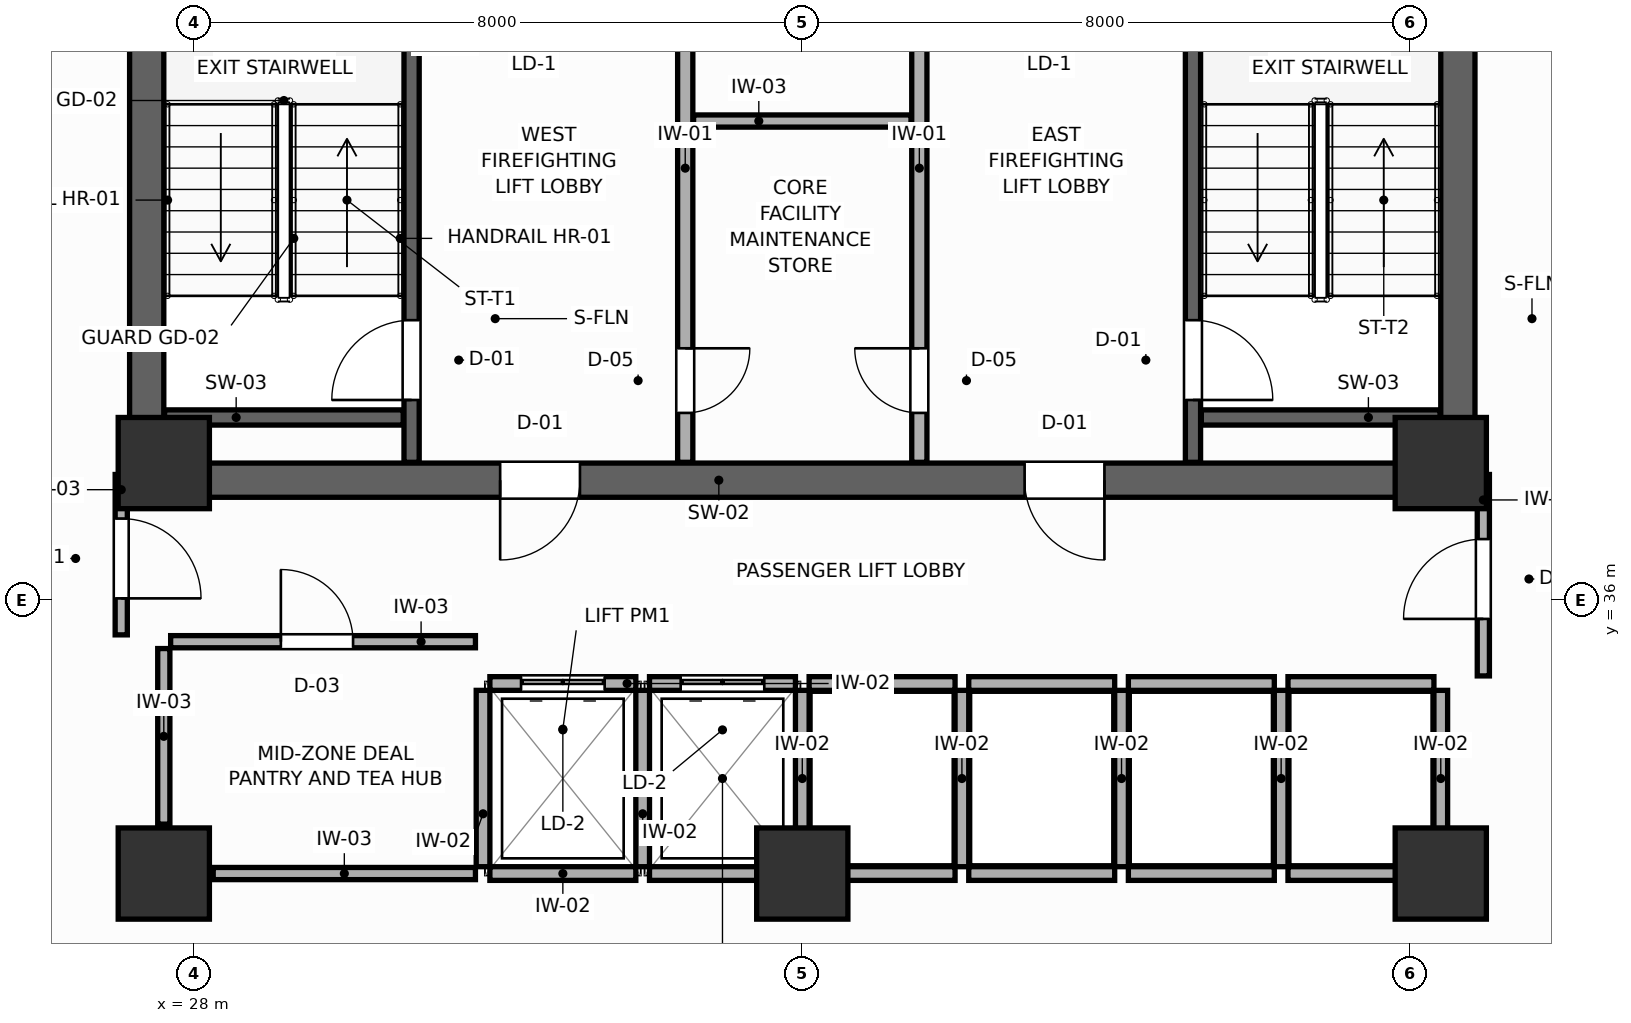
"""IFC4 building model, lengths in metres.
Left out: names, types, materials, properties, quantities, classifications, styles, units other than length and angle.
Written with IfcOpenShell. Run it as: python <this file> out.ifc"""

import sys

from ifc_helpers import new_model, si_unit, direction, frame, frame_2d, origin, origin_2d, place, context, subcontext, project, spatial, rectangle, extrude, source, transform, mapped, element, fill, save


model = new_model("IFC4")
c1 = context("Model", 3, precision=1e-05, world=origin(), true_north=direction((0.0, 1.0)))
c2 = subcontext(c1, "Body", "Model", "MODEL_VIEW")
j1 = project(units=[si_unit("LENGTHUNIT", "METRE"), si_unit("PLANEANGLEUNIT", "RADIAN")], contexts=[c1])
p1 = place(None, origin())
s1 = spatial("IfcSite", under=j1, at=p1, CompositionType="ELEMENT")
p2 = place(p1, origin())
s2 = spatial("IfcBuilding", under=s1, at=p2, CompositionType="ELEMENT")
p3 = place(p2, frame((0.0, 0.0, 157.8)))
s3 = spatial("IfcBuildingStorey", under=s2, at=p3, CompositionType="ELEMENT", Elevation=157.8)
p4 = place(p3, frame((27.15, 37.575, 0.0), z_axis=(0.0, 0.0, 1.0), x_axis=(1.0, 0.0, 0.0)))
e1 = element("IfcWall", 1, at=p4, inside=s3, PredefinedType="SHEAR", context=c2, shape_type="SweptSolid", body=[
    extrude(rectangle(XDim=17.7, YDim=0.45, at=frame_2d((8.85, 0.0))), origin(), (0.0, 0.0, 1.0), 3.6),
])
p5 = place(p4, frame((4.875, 0.0, 0.0)))
e2 = element("IfcOpeningElement", 2, at=p5, cuts=e1, PredefinedType="OPENING", context=c2, shape_type="SweptSolid", body=[
    extrude(rectangle(XDim=1.05, YDim=2.1, at=frame_2d((0.525, 1.05))), frame((0.0, 0.235, 0.0), z_axis=(0.0, -1.0, 0.0), x_axis=(1.0, 0.0, 0.0)), (0.0, 0.0, 1.0), 0.47),
])
p6 = place(p4, frame((11.775, 0.0, 0.0)))
e3 = element("IfcOpeningElement", 3, at=p6, cuts=e1, PredefinedType="OPENING", context=c2, shape_type="SweptSolid", body=[
    extrude(rectangle(XDim=1.05, YDim=2.1, at=frame_2d((0.525, 1.05))), frame((0.0, 0.235, 0.0), z_axis=(0.0, -1.0, 0.0), x_axis=(1.0, 0.0, 0.0)), (0.0, 0.0, 1.0), 0.47),
])
for number, where, z_axis, x_axis in (
    (4, (27.375, 37.8, 0.0), (0.0, 0.0, 1.0), (0.0, 1.0, 0.0)),
    (5, (44.625, 37.8, 0.0), (0.0, 0.0, 1.0), (0.0, 1.0, 0.0)),
):
    element("IfcWall", number, at=place(p3, frame(where, z_axis=z_axis, x_axis=x_axis)), inside=s3, PredefinedType="SHEAR", context=c2, shape_type="SweptSolid", body=[
        extrude(rectangle(XDim=9.0, YDim=0.45, at=frame_2d((4.5, 0.0))), origin(), (0.0, 0.0, 1.0), 3.6),
    ])
m1 = source(origin(), c2, "Body", "SweptSolid", [
    extrude(rectangle(XDim=1.2, YDim=1.2, at=origin_2d()), origin(), (0.0, 0.0, 1.0), 3.6),
])
for number, where, z_axis, x_axis in (
    (6, (27.6, 37.8, 0.0), (0.0, 0.0, 1.0), (1.0, 0.0, 0.0)),
    (7, (44.4, 37.8, 0.0), (0.0, 0.0, 1.0), (1.0, 0.0, 0.0)),
    (8, (27.6, 32.4, 0.0), (0.0, 0.0, 1.0), (1.0, 0.0, 0.0)),
    (9, (44.4, 32.4, 0.0), (0.0, 0.0, 1.0), (1.0, 0.0, 0.0)),
    (10, (36.0, 32.4, 0.0), (0.0, 0.0, 1.0), (1.0, 0.0, 0.0)),
):
    element("IfcColumn", number, at=place(p3, frame(where, z_axis=z_axis, x_axis=x_axis)), inside=s3, PredefinedType="COLUMN", context=c2, shape_type="MappedRepresentation", body=[
        mapped(m1, transform((0.0, 0.0, 0.0), scale=1.0)),
    ])
p7 = place(p3, frame((30.86, 37.81, 0.0), z_axis=(0.0, 0.0, 1.0), x_axis=(0.0, 1.0, 0.0)))
e11 = element("IfcWall", 11, at=p7, inside=s3, PredefinedType="SHEAR", context=c2, shape_type="SweptSolid", body=[
    extrude(rectangle(XDim=8.98, YDim=0.2, at=frame_2d((4.49, 0.0))), origin(), (0.0, 0.0, 1.0), 3.6),
])
p8 = place(p7, frame((0.82, 0.0, 0.0)))
e12 = element("IfcOpeningElement", 12, at=p8, cuts=e11, PredefinedType="OPENING", context=c2, shape_type="SweptSolid", body=[
    extrude(rectangle(XDim=1.05, YDim=2.1, at=frame_2d((0.525, 1.05))), frame((0.0, 0.11, 0.0), z_axis=(0.0, -1.0, 0.0), x_axis=(1.0, 0.0, 0.0)), (0.0, 0.0, 1.0), 0.22),
])
p9 = place(p3, frame((27.61, 38.4, 0.0), z_axis=(0.0, 0.0, 1.0), x_axis=(1.0, 0.0, 0.0)))
e13 = element("IfcWall", 13, at=p9, inside=s3, PredefinedType="SHEAR", context=c2, shape_type="SweptSolid", body=[
    extrude(rectangle(XDim=3.14, YDim=0.2, at=frame_2d((1.57, 0.0))), origin(), (0.0, 0.0, 1.0), 3.6),
])
p10 = place(p3, frame((41.14, 37.81, 0.0), z_axis=(0.0, 0.0, 1.0), x_axis=(0.0, 1.0, 0.0)))
e14 = element("IfcWall", 14, at=p10, inside=s3, PredefinedType="SHEAR", context=c2, shape_type="SweptSolid", body=[
    extrude(rectangle(XDim=8.98, YDim=0.2, at=frame_2d((4.49, 0.0))), origin(), (0.0, 0.0, 1.0), 3.6),
])
p11 = place(p10, frame((0.82, 0.0, 0.0)))
e15 = element("IfcOpeningElement", 15, at=p11, cuts=e14, PredefinedType="OPENING", context=c2, shape_type="SweptSolid", body=[
    extrude(rectangle(XDim=1.05, YDim=2.1, at=frame_2d((0.525, 1.05))), frame((0.0, 0.11, 0.0), z_axis=(0.0, -1.0, 0.0), x_axis=(1.0, 0.0, 0.0)), (0.0, 0.0, 1.0), 0.22),
])
p12 = place(p3, frame((41.25, 38.4, 0.0), z_axis=(0.0, 0.0, 1.0), x_axis=(1.0, 0.0, 0.0)))
e16 = element("IfcWall", 16, at=p12, inside=s3, PredefinedType="SHEAR", context=c2, shape_type="SweptSolid", body=[
    extrude(rectangle(XDim=3.14, YDim=0.2, at=frame_2d((1.57, 0.0))), origin(), (0.0, 0.0, 1.0), 3.6),
])
p13 = place(p3, frame((34.46, 37.81, 0.0), z_axis=(0.0, 0.0, 1.0), x_axis=(0.0, 1.0, 0.0)))
e17 = element("IfcWall", 17, at=p13, inside=s3, PredefinedType="PARTITIONING", context=c2, shape_type="SweptSolid", body=[
    extrude(rectangle(XDim=8.98, YDim=0.2, at=frame_2d((4.49, 0.0))), origin(), (0.0, 0.0, 1.0), 3.4),
])
p14 = place(p13, frame((0.65, 0.0, 0.0)))
e18 = element("IfcOpeningElement", 18, at=p14, cuts=e17, PredefinedType="OPENING", context=c2, shape_type="SweptSolid", body=[
    extrude(rectangle(XDim=0.85, YDim=2.05, at=frame_2d((0.425, 1.025))), frame((0.0, 0.11, 0.0), z_axis=(0.0, -1.0, 0.0), x_axis=(1.0, 0.0, 0.0)), (0.0, 0.0, 1.0), 0.22),
])
p15 = place(p3, frame((37.54, 37.81, 0.0), z_axis=(0.0, 0.0, 1.0), x_axis=(0.0, 1.0, 0.0)))
e19 = element("IfcWall", 19, at=p15, inside=s3, PredefinedType="PARTITIONING", context=c2, shape_type="SweptSolid", body=[
    extrude(rectangle(XDim=8.98, YDim=0.2, at=frame_2d((4.49, 0.0))), origin(), (0.0, 0.0, 1.0), 3.4),
])
p16 = place(p15, frame((0.65, 0.0, 0.0)))
e20 = element("IfcOpeningElement", 20, at=p16, cuts=e19, PredefinedType="OPENING", context=c2, shape_type="SweptSolid", body=[
    extrude(rectangle(XDim=0.85, YDim=2.05, at=frame_2d((0.425, 1.025))), frame((0.0, 0.11, 0.0), z_axis=(0.0, -1.0, 0.0), x_axis=(1.0, 0.0, 0.0)), (0.0, 0.0, 1.0), 0.22),
])
p17 = place(p3, frame((34.57, 42.3, 0.0), z_axis=(0.0, 0.0, 1.0), x_axis=(1.0, 0.0, 0.0)))
e21 = element("IfcWall", 21, at=p17, inside=s3, PredefinedType="PARTITIONING", context=c2, shape_type="SweptSolid", body=[
    extrude(rectangle(XDim=2.86, YDim=0.16, at=frame_2d((1.43, 0.0))), origin(), (0.0, 0.0, 1.0), 3.4),
])
p18 = place(p3, frame((31.89, 34.9, 0.0), z_axis=(0.0, 0.0, 1.0), x_axis=(1.0, 0.0, 0.0)))
e22 = element("IfcWall", 22, at=p18, inside=s3, PredefinedType="PARTITIONING", context=c2, shape_type="SweptSolid", body=[
    extrude(rectangle(XDim=1.92, YDim=0.18, at=frame_2d((0.96, 0.0))), origin(), (0.0, 0.0, 1.0), 3.4),
])
p19 = place(p18, frame((0.41, 0.0, 0.0)))
e23 = element("IfcOpeningElement", 23, at=p19, cuts=e22, PredefinedType="OPENING", context=c2, shape_type="SweptSolid", body=[
    extrude(rectangle(XDim=1.1, YDim=2.1, at=frame_2d((0.55, 1.05))), frame((0.0, 0.1, 0.0), z_axis=(0.0, -1.0, 0.0), x_axis=(1.0, 0.0, 0.0)), (0.0, 0.0, 1.0), 0.2),
])
p20 = place(p3, frame((31.89, 32.4, 0.0), z_axis=(0.0, 0.0, 1.0), x_axis=(1.0, 0.0, 0.0)))
e24 = element("IfcWall", 24, at=p20, inside=s3, PredefinedType="PARTITIONING", context=c2, shape_type="SweptSolid", body=[
    extrude(rectangle(XDim=1.92, YDim=0.18, at=frame_2d((0.96, 0.0))), origin(), (0.0, 0.0, 1.0), 2.95),
])
p21 = place(p3, frame((31.8, 32.49, 0.0), z_axis=(0.0, 0.0, 1.0), x_axis=(0.0, 1.0, 0.0)))
e25 = element("IfcWall", 25, at=p21, inside=s3, PredefinedType="PARTITIONING", context=c2, shape_type="SweptSolid", body=[
    extrude(rectangle(XDim=2.32, YDim=0.18, at=frame_2d((1.16, 0.0))), origin(), (0.0, 0.0, 1.0), 3.4),
])
p22 = place(p3, frame((33.99, 34.9, 0.0), z_axis=(0.0, 0.0, 1.0), x_axis=(1.0, 0.0, 0.0)))
e26 = element("IfcWall", 26, at=p22, inside=s3, PredefinedType="PARTITIONING", context=c2, shape_type="SweptSolid", body=[
    extrude(rectangle(XDim=1.92, YDim=0.18, at=frame_2d((0.96, 0.0))), origin(), (0.0, 0.0, 1.0), 3.4),
])
p23 = place(p22, frame((0.41, 0.0, 0.0)))
e27 = element("IfcOpeningElement", 27, at=p23, cuts=e26, PredefinedType="OPENING", context=c2, shape_type="SweptSolid", body=[
    extrude(rectangle(XDim=1.1, YDim=2.1, at=frame_2d((0.55, 1.05))), frame((0.0, 0.1, 0.0), z_axis=(0.0, -1.0, 0.0), x_axis=(1.0, 0.0, 0.0)), (0.0, 0.0, 1.0), 0.2),
])
p24 = place(p3, frame((33.99, 32.4, 0.0), z_axis=(0.0, 0.0, 1.0), x_axis=(1.0, 0.0, 0.0)))
e28 = element("IfcWall", 28, at=p24, inside=s3, PredefinedType="PARTITIONING", context=c2, shape_type="SweptSolid", body=[
    extrude(rectangle(XDim=1.92, YDim=0.18, at=frame_2d((0.96, 0.0))), origin(), (0.0, 0.0, 1.0), 2.95),
])
p25 = place(p3, frame((33.9, 32.49, 0.0), z_axis=(0.0, 0.0, 1.0), x_axis=(0.0, 1.0, 0.0)))
e29 = element("IfcWall", 29, at=p25, inside=s3, PredefinedType="PARTITIONING", context=c2, shape_type="SweptSolid", body=[
    extrude(rectangle(XDim=2.32, YDim=0.18, at=frame_2d((1.16, 0.0))), origin(), (0.0, 0.0, 1.0), 3.4),
])
p26 = place(p3, frame((36.09, 34.9, 0.0), z_axis=(0.0, 0.0, 1.0), x_axis=(1.0, 0.0, 0.0)))
e30 = element("IfcWall", 30, at=p26, inside=s3, PredefinedType="PARTITIONING", context=c2, shape_type="SweptSolid", body=[
    extrude(rectangle(XDim=1.92, YDim=0.18, at=frame_2d((0.96, 0.0))), origin(), (0.0, 0.0, 1.0), 3.4),
])
p27 = place(p3, frame((36.09, 32.4, 0.0), z_axis=(0.0, 0.0, 1.0), x_axis=(1.0, 0.0, 0.0)))
e31 = element("IfcWall", 31, at=p27, inside=s3, PredefinedType="PARTITIONING", context=c2, shape_type="SweptSolid", body=[
    extrude(rectangle(XDim=1.92, YDim=0.18, at=frame_2d((0.96, 0.0))), origin(), (0.0, 0.0, 1.0), 2.95),
])
p28 = place(p3, frame((36.0, 32.49, 0.0), z_axis=(0.0, 0.0, 1.0), x_axis=(0.0, 1.0, 0.0)))
e32 = element("IfcWall", 32, at=p28, inside=s3, PredefinedType="PARTITIONING", context=c2, shape_type="SweptSolid", body=[
    extrude(rectangle(XDim=2.32, YDim=0.18, at=frame_2d((1.16, 0.0))), origin(), (0.0, 0.0, 1.0), 3.4),
])
p29 = place(p3, frame((38.19, 34.9, 0.0), z_axis=(0.0, 0.0, 1.0), x_axis=(1.0, 0.0, 0.0)))
e33 = element("IfcWall", 33, at=p29, inside=s3, PredefinedType="PARTITIONING", context=c2, shape_type="SweptSolid", body=[
    extrude(rectangle(XDim=1.92, YDim=0.18, at=frame_2d((0.96, 0.0))), origin(), (0.0, 0.0, 1.0), 3.4),
])
p30 = place(p3, frame((38.19, 32.4, 0.0), z_axis=(0.0, 0.0, 1.0), x_axis=(1.0, 0.0, 0.0)))
e34 = element("IfcWall", 34, at=p30, inside=s3, PredefinedType="PARTITIONING", context=c2, shape_type="SweptSolid", body=[
    extrude(rectangle(XDim=1.92, YDim=0.18, at=frame_2d((0.96, 0.0))), origin(), (0.0, 0.0, 1.0), 2.95),
])
p31 = place(p3, frame((38.1, 32.49, 0.0), z_axis=(0.0, 0.0, 1.0), x_axis=(0.0, 1.0, 0.0)))
e35 = element("IfcWall", 35, at=p31, inside=s3, PredefinedType="PARTITIONING", context=c2, shape_type="SweptSolid", body=[
    extrude(rectangle(XDim=2.32, YDim=0.18, at=frame_2d((1.16, 0.0))), origin(), (0.0, 0.0, 1.0), 3.4),
])
p32 = place(p3, frame((40.29, 34.9, 0.0), z_axis=(0.0, 0.0, 1.0), x_axis=(1.0, 0.0, 0.0)))
e36 = element("IfcWall", 36, at=p32, inside=s3, PredefinedType="PARTITIONING", context=c2, shape_type="SweptSolid", body=[
    extrude(rectangle(XDim=1.92, YDim=0.18, at=frame_2d((0.96, 0.0))), origin(), (0.0, 0.0, 1.0), 3.4),
])
p33 = place(p3, frame((40.29, 32.4, 0.0), z_axis=(0.0, 0.0, 1.0), x_axis=(1.0, 0.0, 0.0)))
e37 = element("IfcWall", 37, at=p33, inside=s3, PredefinedType="PARTITIONING", context=c2, shape_type="SweptSolid", body=[
    extrude(rectangle(XDim=1.92, YDim=0.18, at=frame_2d((0.96, 0.0))), origin(), (0.0, 0.0, 1.0), 2.95),
])
p34 = place(p3, frame((40.2, 32.49, 0.0), z_axis=(0.0, 0.0, 1.0), x_axis=(0.0, 1.0, 0.0)))
e38 = element("IfcWall", 38, at=p34, inside=s3, PredefinedType="PARTITIONING", context=c2, shape_type="SweptSolid", body=[
    extrude(rectangle(XDim=2.32, YDim=0.18, at=frame_2d((1.16, 0.0))), origin(), (0.0, 0.0, 1.0), 3.4),
])
p35 = place(p3, frame((42.39, 34.9, 0.0), z_axis=(0.0, 0.0, 1.0), x_axis=(1.0, 0.0, 0.0)))
e39 = element("IfcWall", 39, at=p35, inside=s3, PredefinedType="PARTITIONING", context=c2, shape_type="SweptSolid", body=[
    extrude(rectangle(XDim=1.92, YDim=0.18, at=frame_2d((0.96, 0.0))), origin(), (0.0, 0.0, 1.0), 3.4),
])
p36 = place(p3, frame((42.39, 32.4, 0.0), z_axis=(0.0, 0.0, 1.0), x_axis=(1.0, 0.0, 0.0)))
e40 = element("IfcWall", 40, at=p36, inside=s3, PredefinedType="PARTITIONING", context=c2, shape_type="SweptSolid", body=[
    extrude(rectangle(XDim=1.92, YDim=0.18, at=frame_2d((0.96, 0.0))), origin(), (0.0, 0.0, 1.0), 2.95),
])
for number, where, z_axis, x_axis in (
    (41, (42.3, 32.49, 0.0), (0.0, 0.0, 1.0), (0.0, 1.0, 0.0)),
    (42, (44.4, 32.49, 0.0), (0.0, 0.0, 1.0), (0.0, 1.0, 0.0)),
):
    element("IfcWall", number, at=place(p3, frame(where, z_axis=z_axis, x_axis=x_axis)), inside=s3, PredefinedType="PARTITIONING", context=c2, shape_type="SweptSolid", body=[
        extrude(rectangle(XDim=2.32, YDim=0.18, at=frame_2d((1.16, 0.0))), origin(), (0.0, 0.0, 1.0), 3.4),
    ])
p37 = place(p3, frame((28.25, 32.4, 0.0), z_axis=(0.0, 0.0, 1.0), x_axis=(1.0, 0.0, 0.0)))
e43 = element("IfcWall", 43, at=p37, inside=s3, PredefinedType="PARTITIONING", context=c2, shape_type="SweptSolid", body=[
    extrude(rectangle(XDim=3.45, YDim=0.16, at=frame_2d((1.725, 0.0))), origin(), (0.0, 0.0, 1.0), 2.95),
])
p38 = place(p3, frame((27.6, 33.05, 0.0), z_axis=(0.0, 0.0, 1.0), x_axis=(0.0, 1.0, 0.0)))
e44 = element("IfcWall", 44, at=p38, inside=s3, PredefinedType="PARTITIONING", context=c2, shape_type="SweptSolid", body=[
    extrude(rectangle(XDim=2.31, YDim=0.16, at=frame_2d((1.155, 0.0))), origin(), (0.0, 0.0, 1.0), 3.4),
])
p39 = place(p3, frame((27.69, 35.45, 0.0), z_axis=(0.0, 0.0, 1.0), x_axis=(1.0, 0.0, 0.0)))
e45 = element("IfcWall", 45, at=p39, inside=s3, PredefinedType="PARTITIONING", context=c2, shape_type="SweptSolid", body=[
    extrude(rectangle(XDim=4.01, YDim=0.16, at=frame_2d((2.005, 0.0))), origin(), (0.0, 0.0, 1.0), 3.4),
])
p40 = place(p39, frame((1.45, 0.0, 0.0)))
e46 = element("IfcOpeningElement", 46, at=p40, cuts=e45, PredefinedType="OPENING", context=c2, shape_type="SweptSolid", body=[
    extrude(rectangle(XDim=0.95, YDim=2.05, at=frame_2d((0.475, 1.025))), frame((0.0, 0.09, 0.0), z_axis=(0.0, -1.0, 0.0), x_axis=(1.0, 0.0, 0.0)), (0.0, 0.0, 1.0), 0.18),
])
p41 = place(p3, frame((27.04, 35.54, 0.0), z_axis=(0.0, 0.0, 1.0), x_axis=(0.0, 1.0, 0.0)))
e47 = element("IfcWall", 47, at=p41, inside=s3, PredefinedType="PARTITIONING", context=c2, shape_type="SweptSolid", body=[
    extrude(rectangle(XDim=2.11, YDim=0.16, at=frame_2d((1.055, 0.0))), origin(), (0.0, 0.0, 1.0), 3.4),
])
p42 = place(p41, frame((0.48, 0.0, 0.0)))
e48 = element("IfcOpeningElement", 48, at=p42, cuts=e47, PredefinedType="OPENING", context=c2, shape_type="SweptSolid", body=[
    extrude(rectangle(XDim=1.05, YDim=2.1, at=frame_2d((0.525, 1.05))), frame((0.0, 0.09, 0.0), z_axis=(0.0, -1.0, 0.0), x_axis=(1.0, 0.0, 0.0)), (0.0, 0.0, 1.0), 0.18),
])
p43 = place(p3, frame((44.96, 35.0, 0.0), z_axis=(0.0, 0.0, 1.0), x_axis=(0.0, 1.0, 0.0)))
e49 = element("IfcWall", 49, at=p43, inside=s3, PredefinedType="PARTITIONING", context=c2, shape_type="SweptSolid", body=[
    extrude(rectangle(XDim=2.65, YDim=0.16, at=frame_2d((1.325, 0.0))), origin(), (0.0, 0.0, 1.0), 3.4),
])
p44 = place(p43, frame((0.75, 0.0, 0.0)))
e50 = element("IfcOpeningElement", 50, at=p44, cuts=e49, PredefinedType="OPENING", context=c2, shape_type="SweptSolid", body=[
    extrude(rectangle(XDim=1.05, YDim=2.1, at=frame_2d((0.525, 1.05))), frame((0.0, 0.09, 0.0), z_axis=(0.0, -1.0, 0.0), x_axis=(1.0, 0.0, 0.0)), (0.0, 0.0, 1.0), 0.18),
])
p45 = place(p8, origin())
e51 = element("IfcDoor", 51, at=p45, inside=s3, OperationType="SINGLE_SWING_LEFT", PredefinedType="DOOR", context=c2, shape_type="SweptSolid", body=[
    extrude(rectangle(XDim=1.05, YDim=2.1, at=frame_2d((0.525, 1.05))), frame((0.0, 0.025, 0.0), z_axis=(0.0, -1.0, 0.0), x_axis=(1.0, 0.0, 0.0)), (0.0, 0.0, 1.0), 0.05),
])
fill(e12, e51)
p46 = place(p11, frame((1.05, 0.0, 0.0), z_axis=(0.0, 0.0, 1.0), x_axis=(-1.0, 0.0, 0.0)))
e52 = element("IfcDoor", 52, at=p46, inside=s3, OperationType="SINGLE_SWING_RIGHT", PredefinedType="DOOR", context=c2, shape_type="SweptSolid", body=[
    extrude(rectangle(XDim=1.05, YDim=2.1, at=frame_2d((0.525, 1.05))), frame((0.0, 0.025, 0.0), z_axis=(0.0, -1.0, 0.0), x_axis=(1.0, 0.0, 0.0)), (0.0, 0.0, 1.0), 0.05),
])
fill(e15, e52)
p47 = place(p14, frame((0.85, 0.0, 0.0), z_axis=(0.0, 0.0, 1.0), x_axis=(-1.0, 0.0, 0.0)))
e53 = element("IfcDoor", 53, at=p47, inside=s3, OperationType="SINGLE_SWING_LEFT", PredefinedType="DOOR", context=c2, shape_type="SweptSolid", body=[
    extrude(rectangle(XDim=0.85, YDim=2.05, at=frame_2d((0.425, 1.025))), frame((0.0, 0.025, 0.0), z_axis=(0.0, -1.0, 0.0), x_axis=(1.0, 0.0, 0.0)), (0.0, 0.0, 1.0), 0.05),
])
fill(e18, e53)
p48 = place(p16, origin())
e54 = element("IfcDoor", 54, at=p48, inside=s3, OperationType="SINGLE_SWING_RIGHT", PredefinedType="DOOR", context=c2, shape_type="SweptSolid", body=[
    extrude(rectangle(XDim=0.85, YDim=2.05, at=frame_2d((0.425, 1.025))), frame((0.0, 0.025, 0.0), z_axis=(0.0, -1.0, 0.0), x_axis=(1.0, 0.0, 0.0)), (0.0, 0.0, 1.0), 0.05),
])
fill(e20, e54)
p49 = place(p19, origin())
e55 = element("IfcDoor", 55, at=p49, inside=s3, OperationType="DOUBLE_DOOR_SLIDING", PredefinedType="DOOR", context=c2, shape_type="SweptSolid", body=[
    extrude(rectangle(XDim=1.1, YDim=2.1, at=frame_2d((0.55, 1.05))), frame((0.0, 0.025, 0.0), z_axis=(0.0, -1.0, 0.0), x_axis=(1.0, 0.0, 0.0)), (0.0, 0.0, 1.0), 0.05),
])
fill(e23, e55)
p50 = place(p23, origin())
e56 = element("IfcDoor", 56, at=p50, inside=s3, OperationType="DOUBLE_DOOR_SLIDING", PredefinedType="DOOR", context=c2, shape_type="SweptSolid", body=[
    extrude(rectangle(XDim=1.1, YDim=2.1, at=frame_2d((0.55, 1.05))), frame((0.0, 0.025, 0.0), z_axis=(0.0, -1.0, 0.0), x_axis=(1.0, 0.0, 0.0)), (0.0, 0.0, 1.0), 0.05),
])
fill(e27, e56)
p51 = place(p40, origin())
e57 = element("IfcDoor", 57, at=p51, inside=s3, OperationType="SINGLE_SWING_LEFT", PredefinedType="DOOR", context=c2, shape_type="SweptSolid", body=[
    extrude(rectangle(XDim=0.95, YDim=2.05, at=frame_2d((0.475, 1.025))), frame((0.0, 0.025, 0.0), z_axis=(0.0, -1.0, 0.0), x_axis=(1.0, 0.0, 0.0)), (0.0, 0.0, 1.0), 0.05),
])
fill(e46, e57)
p52 = place(p42, frame((1.05, 0.0, 0.0), z_axis=(0.0, 0.0, 1.0), x_axis=(-1.0, 0.0, 0.0)))
e58 = element("IfcDoor", 58, at=p52, inside=s3, OperationType="SINGLE_SWING_RIGHT", PredefinedType="DOOR", context=c2, shape_type="SweptSolid", body=[
    extrude(rectangle(XDim=1.05, YDim=2.1, at=frame_2d((0.525, 1.05))), frame((0.0, 0.025, 0.0), z_axis=(0.0, -1.0, 0.0), x_axis=(1.0, 0.0, 0.0)), (0.0, 0.0, 1.0), 0.05),
])
fill(e48, e58)
p53 = place(p44, origin())
e59 = element("IfcDoor", 59, at=p53, inside=s3, OperationType="SINGLE_SWING_LEFT", PredefinedType="DOOR", context=c2, shape_type="SweptSolid", body=[
    extrude(rectangle(XDim=1.05, YDim=2.1, at=frame_2d((0.525, 1.05))), frame((0.0, 0.025, 0.0), z_axis=(0.0, -1.0, 0.0), x_axis=(1.0, 0.0, 0.0)), (0.0, 0.0, 1.0), 0.05),
])
fill(e50, e59)
p54 = place(p5, frame((1.05, 0.0, 0.0), z_axis=(0.0, 0.0, 1.0), x_axis=(-1.0, 0.0, 0.0)))
e60 = element("IfcDoor", 60, at=p54, inside=s3, OperationType="SINGLE_SWING_RIGHT", PredefinedType="DOOR", context=c2, shape_type="SweptSolid", body=[
    extrude(rectangle(XDim=1.05, YDim=2.1, at=frame_2d((0.525, 1.05))), frame((0.0, 0.025, 0.0), z_axis=(0.0, -1.0, 0.0), x_axis=(1.0, 0.0, 0.0)), (0.0, 0.0, 1.0), 0.05),
])
fill(e2, e60)
p55 = place(p6, frame((1.05, 0.0, 0.0), z_axis=(0.0, 0.0, 1.0), x_axis=(-1.0, 0.0, 0.0)))
e61 = element("IfcDoor", 61, at=p55, inside=s3, OperationType="SINGLE_SWING_LEFT", PredefinedType="DOOR", context=c2, shape_type="SweptSolid", body=[
    extrude(rectangle(XDim=1.05, YDim=2.1, at=frame_2d((0.525, 1.05))), frame((0.0, 0.025, 0.0), z_axis=(0.0, -1.0, 0.0), x_axis=(1.0, 0.0, 0.0)), (0.0, 0.0, 1.0), 0.05),
])
fill(e3, e61)
save(model, sys.argv[1])
